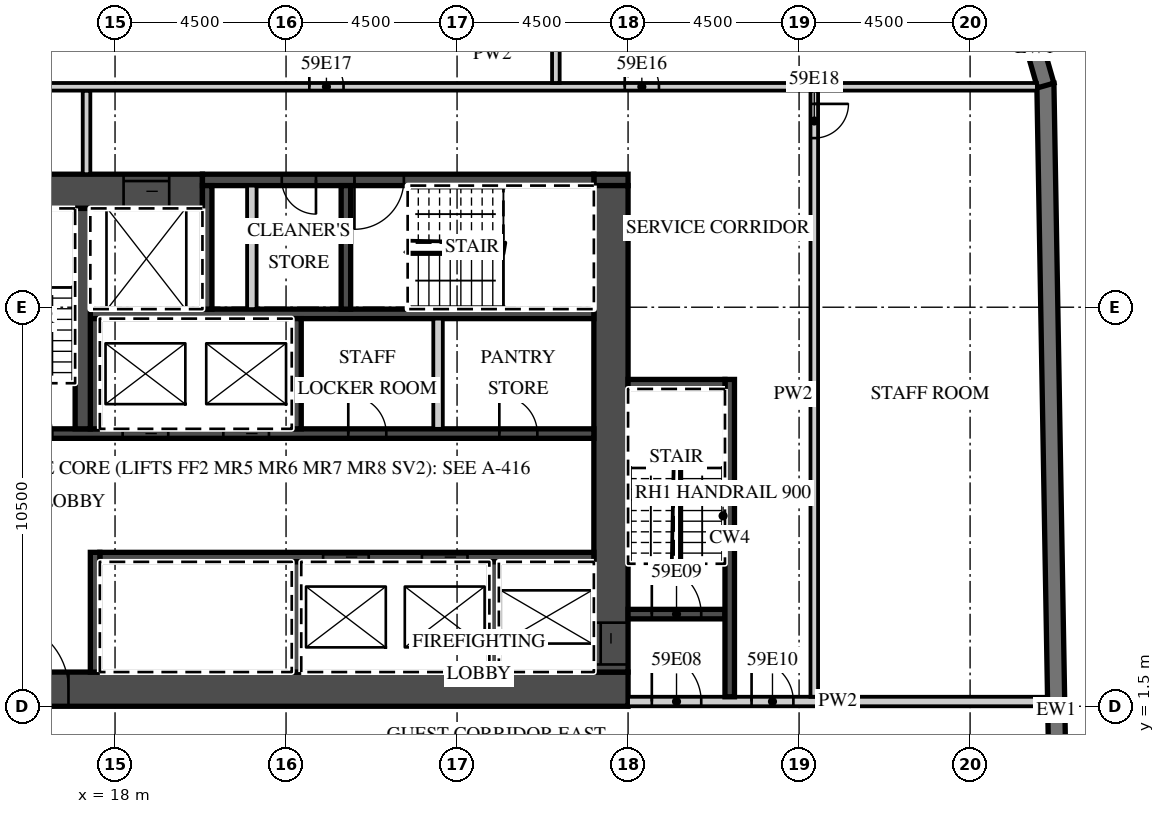
"""IFC4 building model, lengths in metres.
Left out: names, types, materials, properties, quantities, classifications, styles, units other than length and angle.
Written with IfcOpenShell. Run it as: python <this file> out.ifc"""

import sys

from ifc_helpers import new_model, si_unit, direction, frame, frame_2d, origin, place, context, subcontext, project, spatial, polyline, rectangle, outline, extrude, element, fill, save


model = new_model("IFC4")
c1 = context("Model", 3, precision=1e-05, world=origin(), true_north=direction((0.0, 1.0)))
c2 = subcontext(c1, "Body", "Model", "MODEL_VIEW")
j1 = project(units=[si_unit("LENGTHUNIT", "METRE"), si_unit("PLANEANGLEUNIT", "RADIAN")], contexts=[c1])
p1 = place(None, origin())
s1 = spatial("IfcSite", under=j1, at=p1, CompositionType="ELEMENT")
p2 = place(p1, origin())
s2 = spatial("IfcBuilding", under=s1, at=p2, CompositionType="ELEMENT")
p3 = place(p2, frame((0.0, 0.0, 240.8)))
s3 = spatial("IfcBuildingStorey", under=s2, at=p3, CompositionType="ELEMENT", Elevation=240.8)
p4 = place(p3, frame((43.057, -15.103, 0.0), z_axis=(0.0, 0.0, 1.0), x_axis=(-0.017452408953, 0.999847695112, 0.0)))
e1 = element("IfcWall", 1, at=p4, inside=s3, PredefinedType="SOLIDWALL", context=c2, shape_type="SweptSolid", body=[
    extrude(rectangle(XDim=33.0, YDim=0.45, at=frame_2d((16.5, 0.0))), origin(), (0.0, 0.0, 1.0), 3.02),
])
p5 = place(p3, frame((42.49, 17.833, 0.0), z_axis=(0.0, 0.0, 1.0), x_axis=(-0.275546368831, 0.961287781377, 0.0)))
e2 = element("IfcWall", 2, at=p5, inside=s3, PredefinedType="SOLIDWALL", context=c2, shape_type="SweptSolid", body=[
    extrude(outline(polyline([(0.0, -0.225), (2.071, -0.225), (1.95, 0.225), (0.121, 0.225), (0.0, -0.225)])), origin(), (0.0, 0.0, 1.0), 3.02),
])
p6 = place(p3, frame((13.5, 1.95, 0.0), z_axis=(0.0, 0.0, 1.0), x_axis=(1.0, 0.0, 0.0)))
e3 = element("IfcWall", 3, at=p6, inside=s3, PredefinedType="SHEAR", context=c2, shape_type="SweptSolid", body=[
    extrude(rectangle(XDim=18.0, YDim=0.9, at=frame_2d((9.0, 0.0))), origin(), (0.0, 0.0, 1.0), 3.02),
])
p7 = place(p6, frame((1.475, 0.0, 0.0)))
e4 = element("IfcOpeningElement", 4, at=p7, cuts=e3, PredefinedType="OPENING", context=c2, shape_type="SweptSolid", body=[
    extrude(rectangle(XDim=1.8, YDim=2.1, at=frame_2d((0.9, 1.05))), frame((0.0, 0.46, 0.0), z_axis=(0.0, -1.0, 0.0), x_axis=(1.0, 0.0, 0.0)), (0.0, 0.0, 1.0), 0.92),
])
p8 = place(p3, frame((13.5, 15.05, 0.0), z_axis=(0.0, 0.0, 1.0), x_axis=(1.0, 0.0, 0.0)))
e5 = element("IfcWall", 5, at=p8, inside=s3, PredefinedType="SHEAR", context=c2, shape_type="SweptSolid", body=[
    extrude(rectangle(XDim=6.8, YDim=0.9, at=frame_2d((3.4, 0.0))), origin(), (0.0, 0.0, 1.0), 3.02),
])
p9 = place(p8, frame((4.725, 0.0, 0.0)))
e6 = element("IfcOpeningElement", 6, at=p9, cuts=e5, PredefinedType="OPENING", context=c2, shape_type="SweptSolid", body=[
    extrude(rectangle(XDim=1.2, YDim=2.1, at=frame_2d((0.6, 1.05))), frame((0.0, 0.46, 0.0), z_axis=(0.0, -1.0, 0.0), x_axis=(1.0, 0.0, 0.0)), (0.0, 0.0, 1.0), 0.92),
])
p10 = place(p3, frame((30.6, 15.35, 0.0), z_axis=(0.0, 0.0, 1.0), x_axis=(1.0, 0.0, 0.0)))
e7 = element("IfcWall", 7, at=p10, inside=s3, PredefinedType="SHEAR", context=c2, shape_type="SweptSolid", body=[
    extrude(rectangle(XDim=0.9, YDim=0.3, at=frame_2d((0.45, 0.0))), origin(), (0.0, 0.0, 1.0), 3.02),
])
p11 = place(p3, frame((20.3, 15.35, 0.0), z_axis=(0.0, 0.0, 1.0), x_axis=(1.0, 0.0, 0.0)))
e8 = element("IfcWall", 8, at=p11, inside=s3, PredefinedType="SHEAR", context=c2, shape_type="SweptSolid", body=[
    extrude(rectangle(XDim=10.3, YDim=0.3, at=frame_2d((5.15, 0.0))), origin(), (0.0, 0.0, 1.0), 3.02),
])
p12 = place(p11, frame((4.0, 0.0, 0.0)))
e9 = element("IfcOpeningElement", 9, at=p12, cuts=e8, PredefinedType="OPENING", context=c2, shape_type="SweptSolid", body=[
    extrude(rectangle(XDim=1.3, YDim=2.1, at=frame_2d((0.65, 1.05))), frame((0.0, 0.16, 0.0), z_axis=(0.0, -1.0, 0.0), x_axis=(1.0, 0.0, 0.0)), (0.0, 0.0, 1.0), 0.32),
])
p13 = place(p11, frame((2.087, 0.0, 0.0)))
e10 = element("IfcOpeningElement", 10, at=p13, cuts=e8, PredefinedType="OPENING", context=c2, shape_type="SweptSolid", body=[
    extrude(rectangle(XDim=0.9, YDim=2.1, at=frame_2d((0.45, 1.05))), frame((0.0, 0.16, 0.0), z_axis=(0.0, -1.0, 0.0), x_axis=(1.0, 0.0, 0.0)), (0.0, 0.0, 1.0), 0.32),
])
p14 = place(p3, frame((31.05, 2.4, 0.0), z_axis=(0.0, 0.0, 1.0), x_axis=(0.0, 1.0, 0.0)))
e11 = element("IfcWall", 11, at=p14, inside=s3, PredefinedType="SHEAR", context=c2, shape_type="SweptSolid", body=[
    extrude(rectangle(XDim=12.8, YDim=0.9, at=frame_2d((6.4, 0.0))), origin(), (0.0, 0.0, 1.0), 3.02),
])
p15 = place(p14, frame((0.2, 0.0, 0.0)))
e12 = element("IfcOpeningElement", 12, at=p15, cuts=e11, PredefinedType="OPENING", context=c2, shape_type="SweptSolid", body=[
    extrude(rectangle(XDim=1.1, YDim=2.1, at=frame_2d((0.55, 1.05))), frame((0.0, 0.46, 0.0), z_axis=(0.0, -1.0, 0.0), x_axis=(1.0, 0.0, 0.0)), (0.0, 0.0, 1.0), 0.92),
])
p16 = place(p3, frame((17.6, 5.425, 0.0), z_axis=(0.0, 0.0, 1.0), x_axis=(1.0, 0.0, 0.0)))
e13 = element("IfcWall", 13, at=p16, inside=s3, PredefinedType="SHEAR", context=c2, shape_type="SweptSolid", body=[
    extrude(rectangle(XDim=13.0, YDim=0.25, at=frame_2d((6.5, 0.0))), origin(), (0.0, 0.0, 1.0), 3.02),
])
p17 = place(p16, frame((8.475, 0.0, 0.0)))
e14 = element("IfcOpeningElement", 14, at=p17, cuts=e13, PredefinedType="OPENING", context=c2, shape_type="SweptSolid", body=[
    extrude(rectangle(XDim=1.2, YDim=2.1, at=frame_2d((0.6, 1.05))), frame((0.0, 0.135, 0.0), z_axis=(0.0, -1.0, 0.0), x_axis=(1.0, 0.0, 0.0)), (0.0, 0.0, 1.0), 0.27),
])
p18 = place(p16, frame((5.875, 0.0, 0.0)))
e15 = element("IfcOpeningElement", 15, at=p18, cuts=e13, PredefinedType="OPENING", context=c2, shape_type="SweptSolid", body=[
    extrude(rectangle(XDim=1.2, YDim=2.1, at=frame_2d((0.6, 1.05))), frame((0.0, 0.135, 0.0), z_axis=(0.0, -1.0, 0.0), x_axis=(1.0, 0.0, 0.0)), (0.0, 0.0, 1.0), 0.27),
])
p19 = place(p3, frame((17.475, 2.4, 0.0), z_axis=(0.0, 0.0, 1.0), x_axis=(0.0, 1.0, 0.0)))
e16 = element("IfcWall", 16, at=p19, inside=s3, PredefinedType="SHEAR", context=c2, shape_type="SweptSolid", body=[
    extrude(rectangle(XDim=3.15, YDim=0.25, at=frame_2d((1.575, 0.0))), origin(), (0.0, 0.0, 1.0), 3.02),
])
for number, where, z_axis, x_axis in (
    (17, (27.975, 2.4, 0.0), (0.0, 0.0, 1.0), (0.0, 1.0, 0.0)),
    (18, (22.775, 2.4, 0.0), (0.0, 0.0, 1.0), (0.0, 1.0, 0.0)),
):
    element("IfcWall", number, at=place(p3, frame(where, z_axis=z_axis, x_axis=x_axis)), inside=s3, PredefinedType="SHEAR", context=c2, shape_type="SweptSolid", body=[
        extrude(rectangle(XDim=2.9, YDim=0.25, at=frame_2d((1.45, 0.0))), origin(), (0.0, 0.0, 1.0), 3.02),
    ])
p20 = place(p3, frame((14.4, 8.675, 0.0), z_axis=(0.0, 0.0, 1.0), x_axis=(1.0, 0.0, 0.0)))
e19 = element("IfcWall", 19, at=p20, inside=s3, PredefinedType="SHEAR", context=c2, shape_type="SweptSolid", body=[
    extrude(rectangle(XDim=16.2, YDim=0.25, at=frame_2d((8.1, 0.0))), origin(), (0.0, 0.0, 1.0), 3.02),
])
p21 = place(p20, frame((6.45, 0.0, 0.0)))
e20 = element("IfcOpeningElement", 20, at=p21, cuts=e19, PredefinedType="OPENING", context=c2, shape_type="SweptSolid", body=[
    extrude(rectangle(XDim=1.2, YDim=2.1, at=frame_2d((0.6, 1.05))), frame((0.0, 0.135, 0.0), z_axis=(0.0, -1.0, 0.0), x_axis=(1.0, 0.0, 0.0)), (0.0, 0.0, 1.0), 0.27),
])
p22 = place(p20, frame((3.8, 0.0, 0.0)))
e21 = element("IfcOpeningElement", 21, at=p22, cuts=e19, PredefinedType="OPENING", context=c2, shape_type="SweptSolid", body=[
    extrude(rectangle(XDim=1.2, YDim=2.1, at=frame_2d((0.6, 1.05))), frame((0.0, 0.135, 0.0), z_axis=(0.0, -1.0, 0.0), x_axis=(1.0, 0.0, 0.0)), (0.0, 0.0, 1.0), 0.27),
])
p23 = place(p20, frame((0.65, 0.0, 0.0)))
e22 = element("IfcOpeningElement", 22, at=p23, cuts=e19, PredefinedType="OPENING", context=c2, shape_type="SweptSolid", body=[
    extrude(rectangle(XDim=1.3, YDim=2.1, at=frame_2d((0.65, 1.05))), frame((0.0, 0.135, 0.0), z_axis=(0.0, -1.0, 0.0), x_axis=(1.0, 0.0, 0.0)), (0.0, 0.0, 1.0), 0.27),
])
p24 = place(p20, frame((13.712, 0.0, 0.0)))
e23 = element("IfcOpeningElement", 23, at=p24, cuts=e19, PredefinedType="OPENING", context=c2, shape_type="SweptSolid", body=[
    extrude(rectangle(XDim=1.0, YDim=2.1, at=frame_2d((0.5, 1.05))), frame((0.0, 0.135, 0.0), z_axis=(0.0, -1.0, 0.0), x_axis=(1.0, 0.0, 0.0)), (0.0, 0.0, 1.0), 0.27),
])
p25 = place(p20, frame((9.738, 0.0, 0.0)))
e24 = element("IfcOpeningElement", 24, at=p25, cuts=e19, PredefinedType="OPENING", context=c2, shape_type="SweptSolid", body=[
    extrude(rectangle(XDim=1.0, YDim=2.1, at=frame_2d((0.5, 1.05))), frame((0.0, 0.135, 0.0), z_axis=(0.0, -1.0, 0.0), x_axis=(1.0, 0.0, 0.0)), (0.0, 0.0, 1.0), 0.27),
])
p26 = place(p3, frame((17.35, 11.825, 0.0), z_axis=(0.0, 0.0, 1.0), x_axis=(1.0, 0.0, 0.0)))
e25 = element("IfcWall", 25, at=p26, inside=s3, PredefinedType="SHEAR", context=c2, shape_type="SweptSolid", body=[
    extrude(rectangle(XDim=13.25, YDim=0.25, at=frame_2d((6.625, 0.0))), origin(), (0.0, 0.0, 1.0), 3.02),
])
for number, where, z_axis, x_axis in (
    (26, (17.475, 8.8, 0.0), (0.0, 0.0, 1.0), (0.0, 1.0, 0.0)),
    (27, (22.775, 8.8, 0.0), (0.0, 0.0, 1.0), (0.0, 1.0, 0.0)),
):
    element("IfcWall", number, at=place(p3, frame(where, z_axis=z_axis, x_axis=x_axis)), inside=s3, PredefinedType="SHEAR", context=c2, shape_type="SweptSolid", body=[
        extrude(rectangle(XDim=2.9, YDim=0.25, at=frame_2d((1.45, 0.0))), origin(), (0.0, 0.0, 1.0), 3.02),
    ])
p27 = place(p3, frame((26.5, 8.8, 0.0), z_axis=(0.0, 0.0, 1.0), x_axis=(0.0, 1.0, 0.0)))
e28 = element("IfcWall", 28, at=p27, inside=s3, PredefinedType="PARTITIONING", context=c2, shape_type="SweptSolid", body=[
    extrude(rectangle(XDim=2.9, YDim=0.25, at=frame_2d((1.45, 0.0))), origin(), (0.0, 0.0, 1.0), 3.02),
])
p28 = place(p3, frame((17.15, 8.8, 0.0), z_axis=(0.0, 0.0, 1.0), x_axis=(0.0, 1.0, 0.0)))
e29 = element("IfcWall", 29, at=p28, inside=s3, PredefinedType="SHEAR", context=c2, shape_type="SweptSolid", body=[
    extrude(rectangle(XDim=5.8, YDim=0.4, at=frame_2d((2.9, 0.0))), origin(), (0.0, 0.0, 1.0), 3.02),
])
for number, where, z_axis, x_axis in (
    (30, (20.425, 11.95, 0.0), (0.0, 0.0, 1.0), (0.0, 1.0, 0.0)),
    (31, (24.075, 11.95, 0.0), (0.0, 0.0, 1.0), (0.0, 1.0, 0.0)),
):
    element("IfcWall", number, at=place(p3, frame(where, z_axis=z_axis, x_axis=x_axis)), inside=s3, PredefinedType="SHEAR", context=c2, shape_type="SweptSolid", body=[
        extrude(rectangle(XDim=3.25, YDim=0.25, at=frame_2d((1.625, 0.0))), origin(), (0.0, 0.0, 1.0), 3.02),
    ])
p29 = place(p3, frame((21.6, 11.95, 0.0), z_axis=(0.0, 0.0, 1.0), x_axis=(0.0, 1.0, 0.0)))
e32 = element("IfcWall", 32, at=p29, inside=s3, PredefinedType="PARTITIONING", context=c2, shape_type="SweptSolid", body=[
    extrude(rectangle(XDim=3.25, YDim=0.25, at=frame_2d((1.625, 0.0))), origin(), (0.0, 0.0, 1.0), 3.02),
])
p30 = place(p3, frame((31.5, 1.625, 0.0), z_axis=(0.0, 0.0, 1.0), x_axis=(1.0, 0.0, 0.0)))
e33 = element("IfcWall", 33, at=p30, inside=s3, PredefinedType="PARTITIONING", context=c2, shape_type="SweptSolid", body=[
    extrude(rectangle(XDim=11.04, YDim=0.25, at=frame_2d((5.52, 0.0))), origin(), (0.0, 0.0, 1.0), 3.02),
])
p31 = place(p30, frame((0.625, 0.0, 0.0)))
e34 = element("IfcOpeningElement", 34, at=p31, cuts=e33, PredefinedType="OPENING", context=c2, shape_type="SweptSolid", body=[
    extrude(rectangle(XDim=1.3, YDim=2.1, at=frame_2d((0.65, 1.05))), frame((0.0, 0.135, 0.0), z_axis=(0.0, -1.0, 0.0), x_axis=(1.0, 0.0, 0.0)), (0.0, 0.0, 1.0), 0.27),
])
p32 = place(p30, frame((3.25, 0.0, 0.0)))
e35 = element("IfcOpeningElement", 35, at=p32, cuts=e33, PredefinedType="OPENING", context=c2, shape_type="SweptSolid", body=[
    extrude(rectangle(XDim=1.1, YDim=2.1, at=frame_2d((0.55, 1.05))), frame((0.0, 0.135, 0.0), z_axis=(0.0, -1.0, 0.0), x_axis=(1.0, 0.0, 0.0)), (0.0, 0.0, 1.0), 0.27),
])
p33 = place(p3, frame((31.5, 3.925, 0.0), z_axis=(0.0, 0.0, 1.0), x_axis=(1.0, 0.0, 0.0)))
e36 = element("IfcWall", 36, at=p33, inside=s3, PredefinedType="SHEAR", context=c2, shape_type="SweptSolid", body=[
    extrude(rectangle(XDim=2.55, YDim=0.25, at=frame_2d((1.275, 0.0))), origin(), (0.0, 0.0, 1.0), 3.02),
])
p34 = place(p33, frame((0.625, 0.0, 0.0)))
e37 = element("IfcOpeningElement", 37, at=p34, cuts=e36, PredefinedType="OPENING", context=c2, shape_type="SweptSolid", body=[
    extrude(rectangle(XDim=1.3, YDim=2.1, at=frame_2d((0.65, 1.05))), frame((0.0, 0.135, 0.0), z_axis=(0.0, -1.0, 0.0), x_axis=(1.0, 0.0, 0.0)), (0.0, 0.0, 1.0), 0.27),
])
p35 = place(p3, frame((34.175, 1.75, 0.0), z_axis=(0.0, 0.0, 1.0), x_axis=(0.0, 1.0, 0.0)))
e38 = element("IfcWall", 38, at=p35, inside=s3, PredefinedType="SHEAR", context=c2, shape_type="SweptSolid", body=[
    extrude(rectangle(XDim=8.35, YDim=0.25, at=frame_2d((4.175, 0.0))), origin(), (0.0, 0.0, 1.0), 3.02),
])
p36 = place(p3, frame((31.5, 9.975, 0.0), z_axis=(0.0, 0.0, 1.0), x_axis=(1.0, 0.0, 0.0)))
e39 = element("IfcWall", 39, at=p36, inside=s3, PredefinedType="SHEAR", context=c2, shape_type="SweptSolid", body=[
    extrude(rectangle(XDim=2.55, YDim=0.25, at=frame_2d((1.275, 0.0))), origin(), (0.0, 0.0, 1.0), 3.02),
])
p37 = place(p3, frame((17.25, 15.5, 0.0), z_axis=(0.0, 0.0, 1.0), x_axis=(0.0, 1.0, 0.0)))
e40 = element("IfcWall", 40, at=p37, inside=s3, PredefinedType="PARTITIONING", context=c2, shape_type="SweptSolid", body=[
    extrude(rectangle(XDim=2.2, YDim=0.2, at=frame_2d((1.1, 0.0))), origin(), (0.0, 0.0, 1.0), 3.02),
])
p38 = place(p3, frame((36.4, 1.75, 0.0), z_axis=(0.0, 0.0, 1.0), x_axis=(0.0, 1.0, 0.0)))
e41 = element("IfcWall", 41, at=p38, inside=s3, PredefinedType="PARTITIONING", context=c2, shape_type="SweptSolid", body=[
    extrude(rectangle(XDim=15.95, YDim=0.2, at=frame_2d((7.975, 0.0))), origin(), (0.0, 0.0, 1.0), 3.02),
])
p39 = place(p38, frame((14.7, 0.0, 0.0)))
e42 = element("IfcOpeningElement", 42, at=p39, cuts=e41, PredefinedType="OPENING", context=c2, shape_type="SweptSolid", body=[
    extrude(rectangle(XDim=0.9, YDim=2.1, at=frame_2d((0.45, 1.05))), frame((0.0, 0.11, 0.0), z_axis=(0.0, -1.0, 0.0), x_axis=(1.0, 0.0, 0.0)), (0.0, 0.0, 1.0), 0.22),
])
p40 = place(p3, frame((13.6, 17.8, 0.0), z_axis=(0.0, 0.0, 1.0), x_axis=(1.0, 0.0, 0.0)))
e43 = element("IfcWall", 43, at=p40, inside=s3, PredefinedType="PARTITIONING", context=c2, shape_type="SweptSolid", body=[
    extrude(rectangle(XDim=28.657, YDim=0.2, at=frame_2d((14.329, 0.0))), origin(), (0.0, 0.0, 1.0), 3.02),
])
p41 = place(p40, frame((17.812, 0.0, 0.0)))
e44 = element("IfcOpeningElement", 44, at=p41, cuts=e43, PredefinedType="OPENING", context=c2, shape_type="SweptSolid", body=[
    extrude(rectangle(XDim=0.9, YDim=2.1, at=frame_2d((0.45, 1.05))), frame((0.0, 0.11, 0.0), z_axis=(0.0, -1.0, 0.0), x_axis=(1.0, 0.0, 0.0)), (0.0, 0.0, 1.0), 0.22),
])
p42 = place(p40, frame((9.512, 0.0, 0.0)))
e45 = element("IfcOpeningElement", 45, at=p42, cuts=e43, PredefinedType="OPENING", context=c2, shape_type="SweptSolid", body=[
    extrude(rectangle(XDim=0.9, YDim=2.1, at=frame_2d((0.45, 1.05))), frame((0.0, 0.11, 0.0), z_axis=(0.0, -1.0, 0.0), x_axis=(1.0, 0.0, 0.0)), (0.0, 0.0, 1.0), 0.22),
])
p43 = place(p3, frame((29.6, 17.9, 0.0), z_axis=(0.0, 0.0, 1.0), x_axis=(0.0, 1.0, 0.0)))
e46 = element("IfcWall", 46, at=p43, inside=s3, PredefinedType="PARTITIONING", context=c2, shape_type="SweptSolid", body=[
    extrude(rectangle(XDim=3.318, YDim=0.2, at=frame_2d((1.659, 0.0))), origin(), (0.0, 0.0, 1.0), 3.02),
])
p44 = place(p21, origin())
e47 = element("IfcDoor", 47, at=p44, inside=s3, OperationType="SLIDING_TO_LEFT", PredefinedType="DOOR", context=c2, shape_type="SweptSolid", body=[
    extrude(rectangle(XDim=1.2, YDim=2.1, at=frame_2d((0.6, 1.05))), frame((0.0, 0.025, 0.0), z_axis=(0.0, -1.0, 0.0), x_axis=(1.0, 0.0, 0.0)), (0.0, 0.0, 1.0), 0.05),
])
fill(e20, e47)
p45 = place(p22, origin())
e48 = element("IfcDoor", 48, at=p45, inside=s3, OperationType="SLIDING_TO_RIGHT", PredefinedType="DOOR", context=c2, shape_type="SweptSolid", body=[
    extrude(rectangle(XDim=1.2, YDim=2.1, at=frame_2d((0.6, 1.05))), frame((0.0, 0.025, 0.0), z_axis=(0.0, -1.0, 0.0), x_axis=(1.0, 0.0, 0.0)), (0.0, 0.0, 1.0), 0.05),
])
fill(e21, e48)
p46 = place(p17, origin())
e49 = element("IfcDoor", 49, at=p46, inside=s3, OperationType="SLIDING_TO_LEFT", PredefinedType="DOOR", context=c2, shape_type="SweptSolid", body=[
    extrude(rectangle(XDim=1.2, YDim=2.1, at=frame_2d((0.6, 1.05))), frame((0.0, 0.025, 0.0), z_axis=(0.0, -1.0, 0.0), x_axis=(1.0, 0.0, 0.0)), (0.0, 0.0, 1.0), 0.05),
])
fill(e14, e49)
p47 = place(p18, origin())
e50 = element("IfcDoor", 50, at=p47, inside=s3, OperationType="SLIDING_TO_RIGHT", PredefinedType="DOOR", context=c2, shape_type="SweptSolid", body=[
    extrude(rectangle(XDim=1.2, YDim=2.1, at=frame_2d((0.6, 1.05))), frame((0.0, 0.025, 0.0), z_axis=(0.0, -1.0, 0.0), x_axis=(1.0, 0.0, 0.0)), (0.0, 0.0, 1.0), 0.05),
])
fill(e15, e50)
p48 = place(p9, origin())
e51 = element("IfcDoor", 51, at=p48, inside=s3, OperationType="SLIDING_TO_LEFT", PredefinedType="DOOR", context=c2, shape_type="SweptSolid", body=[
    extrude(rectangle(XDim=1.2, YDim=2.1, at=frame_2d((0.6, 1.05))), frame((0.0, 0.025, 0.0), z_axis=(0.0, -1.0, 0.0), x_axis=(1.0, 0.0, 0.0)), (0.0, 0.0, 1.0), 0.05),
])
fill(e6, e51)
p49 = place(p15, origin())
e52 = element("IfcDoor", 52, at=p49, inside=s3, OperationType="SLIDING_TO_LEFT", PredefinedType="DOOR", context=c2, shape_type="SweptSolid", body=[
    extrude(rectangle(XDim=1.1, YDim=2.1, at=frame_2d((0.55, 1.05))), frame((0.0, 0.025, 0.0), z_axis=(0.0, -1.0, 0.0), x_axis=(1.0, 0.0, 0.0)), (0.0, 0.0, 1.0), 0.05),
])
fill(e12, e52)
p50 = place(p7, origin())
e53 = element("IfcDoor", 53, at=p50, inside=s3, OperationType="DOUBLE_DOOR_DOUBLE_SWING", PredefinedType="DOOR", context=c2, shape_type="SweptSolid", body=[
    extrude(rectangle(XDim=1.8, YDim=2.1, at=frame_2d((0.9, 1.05))), frame((0.0, 0.025, 0.0), z_axis=(0.0, -1.0, 0.0), x_axis=(1.0, 0.0, 0.0)), (0.0, 0.0, 1.0), 0.05),
])
fill(e4, e53)
p51 = place(p31, origin())
e54 = element("IfcDoor", 54, at=p51, inside=s3, OperationType="SINGLE_SWING_LEFT", PredefinedType="DOOR", context=c2, shape_type="SweptSolid", body=[
    extrude(rectangle(XDim=1.3, YDim=2.1, at=frame_2d((0.65, 1.05))), frame((0.0, 0.025, 0.0), z_axis=(0.0, -1.0, 0.0), x_axis=(1.0, 0.0, 0.0)), (0.0, 0.0, 1.0), 0.05),
])
fill(e34, e54)
p52 = place(p34, origin())
e55 = element("IfcDoor", 55, at=p52, inside=s3, OperationType="SINGLE_SWING_LEFT", PredefinedType="DOOR", context=c2, shape_type="SweptSolid", body=[
    extrude(rectangle(XDim=1.3, YDim=2.1, at=frame_2d((0.65, 1.05))), frame((0.0, 0.025, 0.0), z_axis=(0.0, -1.0, 0.0), x_axis=(1.0, 0.0, 0.0)), (0.0, 0.0, 1.0), 0.05),
])
fill(e37, e55)
p53 = place(p32, origin())
e56 = element("IfcDoor", 56, at=p53, inside=s3, OperationType="SINGLE_SWING_LEFT", PredefinedType="DOOR", context=c2, shape_type="SweptSolid", body=[
    extrude(rectangle(XDim=1.1, YDim=2.1, at=frame_2d((0.55, 1.05))), frame((0.0, 0.025, 0.0), z_axis=(0.0, -1.0, 0.0), x_axis=(1.0, 0.0, 0.0)), (0.0, 0.0, 1.0), 0.05),
])
fill(e35, e56)
p54 = place(p12, origin())
e57 = element("IfcDoor", 57, at=p54, inside=s3, OperationType="SINGLE_SWING_LEFT", PredefinedType="DOOR", context=c2, shape_type="SweptSolid", body=[
    extrude(rectangle(XDim=1.3, YDim=2.1, at=frame_2d((0.65, 1.05))), frame((0.0, 0.025, 0.0), z_axis=(0.0, -1.0, 0.0), x_axis=(1.0, 0.0, 0.0)), (0.0, 0.0, 1.0), 0.05),
])
fill(e9, e57)
p55 = place(p13, origin())
e58 = element("IfcDoor", 58, at=p55, inside=s3, OperationType="SINGLE_SWING_RIGHT", PredefinedType="DOOR", context=c2, shape_type="SweptSolid", body=[
    extrude(rectangle(XDim=0.9, YDim=2.1, at=frame_2d((0.45, 1.05))), frame((0.0, 0.025, 0.0), z_axis=(0.0, -1.0, 0.0), x_axis=(1.0, 0.0, 0.0)), (0.0, 0.0, 1.0), 0.05),
])
fill(e10, e58)
p56 = place(p24, origin())
e59 = element("IfcDoor", 59, at=p56, inside=s3, OperationType="SINGLE_SWING_LEFT", PredefinedType="DOOR", context=c2, shape_type="SweptSolid", body=[
    extrude(rectangle(XDim=1.0, YDim=2.1, at=frame_2d((0.5, 1.05))), frame((0.0, 0.025, 0.0), z_axis=(0.0, -1.0, 0.0), x_axis=(1.0, 0.0, 0.0)), (0.0, 0.0, 1.0), 0.05),
])
fill(e23, e59)
p57 = place(p25, origin())
e60 = element("IfcDoor", 60, at=p57, inside=s3, OperationType="SINGLE_SWING_LEFT", PredefinedType="DOOR", context=c2, shape_type="SweptSolid", body=[
    extrude(rectangle(XDim=1.0, YDim=2.1, at=frame_2d((0.5, 1.05))), frame((0.0, 0.025, 0.0), z_axis=(0.0, -1.0, 0.0), x_axis=(1.0, 0.0, 0.0)), (0.0, 0.0, 1.0), 0.05),
])
fill(e24, e60)
p58 = place(p41, origin())
e61 = element("IfcDoor", 61, at=p58, inside=s3, OperationType="SINGLE_SWING_LEFT", PredefinedType="DOOR", context=c2, shape_type="SweptSolid", body=[
    extrude(rectangle(XDim=0.9, YDim=2.1, at=frame_2d((0.45, 1.05))), frame((0.0, 0.025, 0.0), z_axis=(0.0, -1.0, 0.0), x_axis=(1.0, 0.0, 0.0)), (0.0, 0.0, 1.0), 0.05),
])
fill(e44, e61)
p59 = place(p42, origin())
e62 = element("IfcDoor", 62, at=p59, inside=s3, OperationType="SINGLE_SWING_LEFT", PredefinedType="DOOR", context=c2, shape_type="SweptSolid", body=[
    extrude(rectangle(XDim=0.9, YDim=2.1, at=frame_2d((0.45, 1.05))), frame((0.0, 0.025, 0.0), z_axis=(0.0, -1.0, 0.0), x_axis=(1.0, 0.0, 0.0)), (0.0, 0.0, 1.0), 0.05),
])
fill(e45, e62)
p60 = place(p39, origin())
e63 = element("IfcDoor", 63, at=p60, inside=s3, OperationType="SINGLE_SWING_RIGHT", PredefinedType="DOOR", context=c2, shape_type="SweptSolid", body=[
    extrude(rectangle(XDim=0.9, YDim=2.1, at=frame_2d((0.45, 1.05))), frame((0.0, 0.025, 0.0), z_axis=(0.0, -1.0, 0.0), x_axis=(1.0, 0.0, 0.0)), (0.0, 0.0, 1.0), 0.05),
])
fill(e42, e63)
save(model, sys.argv[1])
